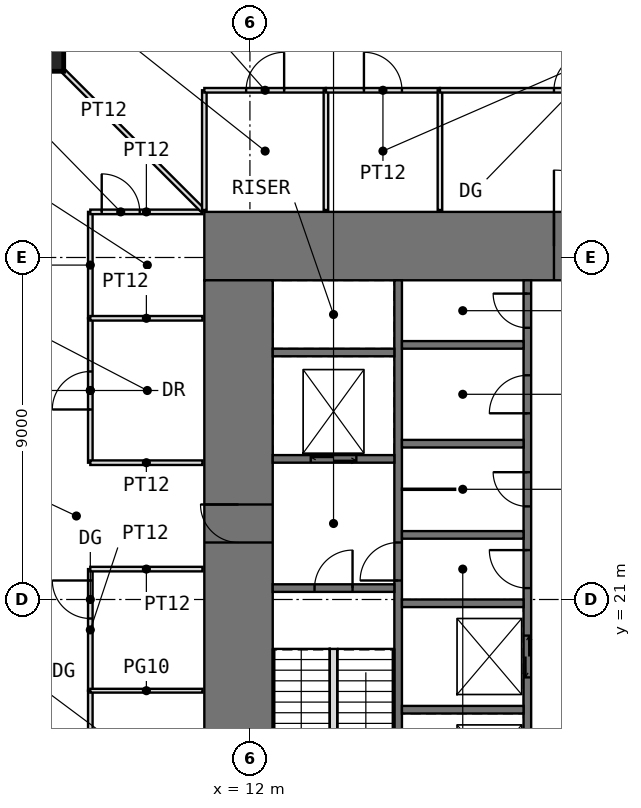
"""IFC4 building model, lengths in metres.
Left out: names, types, materials, properties, quantities, classifications, styles, units other than length and angle.
Written with IfcOpenShell. Run it as: python <this file> out.ifc"""

import sys

from ifc_helpers import new_model, si_unit, direction, frame, frame_2d, origin, origin_2d, place, context, subcontext, project, spatial, rectangle, extrude, element, fill, save


model = new_model("IFC4")
c1 = context("Model", 3, precision=1e-05, world=origin(), true_north=direction((0.0, 1.0)))
c2 = subcontext(c1, "Body", "Model", "MODEL_VIEW")
j1 = project(units=[si_unit("LENGTHUNIT", "METRE"), si_unit("PLANEANGLEUNIT", "RADIAN")], contexts=[c1])
p1 = place(None, origin())
s1 = spatial("IfcSite", under=j1, at=p1, CompositionType="ELEMENT")
p2 = place(p1, origin())
s2 = spatial("IfcBuilding", under=s1, at=p2, CompositionType="ELEMENT")
p3 = place(p2, frame((0.0, 0.0, 62.5)))
s3 = spatial("IfcBuildingStorey", under=s2, at=p3, CompositionType="ELEMENT", Elevation=62.5)
p4 = place(p3, frame((6.55, 35.45, 0.0), z_axis=(0.0, 0.0, 1.0), x_axis=(1.0, 0.0, 0.0)))
e1 = element("IfcColumn", 1, at=p4, inside=s3, PredefinedType="COLUMN", context=c2, shape_type="SweptSolid", body=[
    extrude(rectangle(XDim=1.1, YDim=1.1, at=origin_2d()), origin(), (0.0, 0.0, 1.0), 4.0),
])
p5 = place(p3, frame((10.8, 30.3, -0.05), z_axis=(0.0, 0.0, 1.0), x_axis=(1.0, 0.0, 0.0)))
e2 = element("IfcWall", 2, at=p5, inside=s3, PredefinedType="SHEAR", context=c2, shape_type="SweptSolid", body=[
    extrude(rectangle(XDim=20.4, YDim=1.8, at=frame_2d((10.2, 0.0))), origin(), (0.0, 0.0, 1.0), 4.0),
])
p6 = place(p5, frame((9.2, 0.0, 0.05)))
e3 = element("IfcOpeningElement", 3, at=p6, cuts=e2, PredefinedType="OPENING", context=c2, shape_type="SweptSolid", body=[
    extrude(rectangle(XDim=2.0, YDim=2.2, at=frame_2d((1.0, 1.1))), frame((0.0, 0.91, 0.0), z_axis=(0.0, -1.0, 0.0), x_axis=(1.0, 0.0, 0.0)), (0.0, 0.0, 1.0), 1.82),
])
p7 = place(p3, frame((11.7, 12.6, -0.05), z_axis=(0.0, 0.0, 1.0), x_axis=(0.0, 1.0, 0.0)))
e4 = element("IfcWall", 4, at=p7, inside=s3, PredefinedType="SHEAR", context=c2, shape_type="SweptSolid", body=[
    extrude(rectangle(XDim=16.8, YDim=1.8, at=frame_2d((8.4, 0.0))), origin(), (0.0, 0.0, 1.0), 4.0),
])
p8 = place(p7, frame((9.9, 0.0, 0.05)))
e5 = element("IfcOpeningElement", 5, at=p8, cuts=e4, PredefinedType="OPENING", context=c2, shape_type="SweptSolid", body=[
    extrude(rectangle(XDim=1.0, YDim=2.2, at=frame_2d((0.5, 1.1))), frame((0.0, 0.91, 0.0), z_axis=(0.0, -1.0, 0.0), x_axis=(1.0, 0.0, 0.0)), (0.0, 0.0, 1.0), 1.82),
])
p9 = place(p3, frame((15.9, 12.6, -0.05), z_axis=(0.0, 0.0, 1.0), x_axis=(0.0, 1.0, 0.0)))
e6 = element("IfcWall", 6, at=p9, inside=s3, PredefinedType="SHEAR", context=c2, shape_type="SweptSolid", body=[
    extrude(rectangle(XDim=16.8, YDim=0.2, at=frame_2d((8.4, 0.0))), origin(), (0.0, 0.0, 1.0), 4.0),
])
p10 = place(p9, frame((8.9, 0.0, 0.05)))
e7 = element("IfcOpeningElement", 7, at=p10, cuts=e6, PredefinedType="OPENING", context=c2, shape_type="SweptSolid", body=[
    extrude(rectangle(XDim=1.0, YDim=2.2, at=frame_2d((0.5, 1.1))), frame((0.0, 0.11, 0.0), z_axis=(0.0, -1.0, 0.0), x_axis=(1.0, 0.0, 0.0)), (0.0, 0.0, 1.0), 0.22),
])
p11 = place(p3, frame((19.3, 12.6, -0.05), z_axis=(0.0, 0.0, 1.0), x_axis=(0.0, 1.0, 0.0)))
e8 = element("IfcWall", 8, at=p11, inside=s3, PredefinedType="SHEAR", context=c2, shape_type="SweptSolid", body=[
    extrude(rectangle(XDim=16.8, YDim=0.2, at=frame_2d((8.4, 0.0))), origin(), (0.0, 0.0, 1.0), 4.0),
])
p12 = place(p11, frame((8.7, 0.0, 0.05)))
e9 = element("IfcOpeningElement", 9, at=p12, cuts=e8, PredefinedType="OPENING", context=c2, shape_type="SweptSolid", body=[
    extrude(rectangle(XDim=1.0, YDim=2.2, at=frame_2d((0.5, 1.1))), frame((0.0, 0.11, 0.0), z_axis=(0.0, -1.0, 0.0), x_axis=(1.0, 0.0, 0.0)), (0.0, 0.0, 1.0), 0.22),
])
p13 = place(p11, frame((10.85, 0.0, 0.05)))
e10 = element("IfcOpeningElement", 10, at=p13, cuts=e8, PredefinedType="OPENING", context=c2, shape_type="SweptSolid", body=[
    extrude(rectangle(XDim=0.9, YDim=2.2, at=frame_2d((0.45, 1.1))), frame((0.0, 0.11, 0.0), z_axis=(0.0, -1.0, 0.0), x_axis=(1.0, 0.0, 0.0)), (0.0, 0.0, 1.0), 0.22),
])
p14 = place(p11, frame((13.3, 0.0, 0.05)))
e11 = element("IfcOpeningElement", 11, at=p14, cuts=e8, PredefinedType="OPENING", context=c2, shape_type="SweptSolid", body=[
    extrude(rectangle(XDim=1.0, YDim=2.2, at=frame_2d((0.5, 1.1))), frame((0.0, 0.11, 0.0), z_axis=(0.0, -1.0, 0.0), x_axis=(1.0, 0.0, 0.0)), (0.0, 0.0, 1.0), 0.22),
])
p15 = place(p11, frame((15.55, 0.0, 0.05)))
e12 = element("IfcOpeningElement", 12, at=p15, cuts=e8, PredefinedType="OPENING", context=c2, shape_type="SweptSolid", body=[
    extrude(rectangle(XDim=0.9, YDim=2.2, at=frame_2d((0.45, 1.1))), frame((0.0, 0.11, 0.0), z_axis=(0.0, -1.0, 0.0), x_axis=(1.0, 0.0, 0.0)), (0.0, 0.0, 1.0), 0.22),
])
p16 = place(p11, frame((0.75, 0.0, 0.05)))
e13 = element("IfcOpeningElement", 13, at=p16, cuts=e8, PredefinedType="OPENING", context=c2, shape_type="SweptSolid", body=[
    extrude(rectangle(XDim=1.1, YDim=2.2, at=frame_2d((0.55, 1.1))), frame((0.0, 0.11, 0.0), z_axis=(0.0, -1.0, 0.0), x_axis=(1.0, 0.0, 0.0)), (0.0, 0.0, 1.0), 0.22),
])
p17 = place(p11, frame((3.55, 0.0, 0.05)))
e14 = element("IfcOpeningElement", 14, at=p17, cuts=e8, PredefinedType="OPENING", context=c2, shape_type="SweptSolid", body=[
    extrude(rectangle(XDim=1.1, YDim=2.2, at=frame_2d((0.55, 1.1))), frame((0.0, 0.11, 0.0), z_axis=(0.0, -1.0, 0.0), x_axis=(1.0, 0.0, 0.0)), (0.0, 0.0, 1.0), 0.22),
])
p18 = place(p11, frame((6.35, 0.0, 0.05)))
e15 = element("IfcOpeningElement", 15, at=p18, cuts=e8, PredefinedType="OPENING", context=c2, shape_type="SweptSolid", body=[
    extrude(rectangle(XDim=1.1, YDim=2.2, at=frame_2d((0.55, 1.1))), frame((0.0, 0.11, 0.0), z_axis=(0.0, -1.0, 0.0), x_axis=(1.0, 0.0, 0.0)), (0.0, 0.0, 1.0), 0.22),
])
p19 = place(p3, frame((12.6, 21.3, -0.05), z_axis=(0.0, 0.0, 1.0), x_axis=(1.0, 0.0, 0.0)))
e16 = element("IfcWall", 16, at=p19, inside=s3, PredefinedType="SHEAR", context=c2, shape_type="SweptSolid", body=[
    extrude(rectangle(XDim=3.2, YDim=0.2, at=frame_2d((1.6, 0.0))), origin(), (0.0, 0.0, 1.0), 4.0),
])
p20 = place(p19, frame((1.1, 0.0, 0.05)))
e17 = element("IfcOpeningElement", 17, at=p20, cuts=e16, PredefinedType="OPENING", context=c2, shape_type="SweptSolid", body=[
    extrude(rectangle(XDim=1.0, YDim=2.2, at=frame_2d((0.5, 1.1))), frame((0.0, 0.11, 0.0), z_axis=(0.0, -1.0, 0.0), x_axis=(1.0, 0.0, 0.0)), (0.0, 0.0, 1.0), 0.22),
])
p21 = place(p3, frame((12.6, 24.7, -0.05), z_axis=(0.0, 0.0, 1.0), x_axis=(1.0, 0.0, 0.0)))
e18 = element("IfcWall", 18, at=p21, inside=s3, PredefinedType="SHEAR", context=c2, shape_type="SweptSolid", body=[
    extrude(rectangle(XDim=3.2, YDim=0.2, at=frame_2d((1.6, 0.0))), origin(), (0.0, 0.0, 1.0), 4.0),
])
p22 = place(p21, frame((1.0, 0.0, 0.05)))
e19 = element("IfcOpeningElement", 19, at=p22, cuts=e18, PredefinedType="OPENING", context=c2, shape_type="SweptSolid", body=[
    extrude(rectangle(XDim=1.2, YDim=2.2, at=frame_2d((0.6, 1.1))), frame((0.0, 0.11, 0.0), z_axis=(0.0, -1.0, 0.0), x_axis=(1.0, 0.0, 0.0)), (0.0, 0.0, 1.0), 0.22),
])
for number, where, z_axis, x_axis in (
    (20, (12.6, 27.5, -0.05), (0.0, 0.0, 1.0), (1.0, 0.0, 0.0)),
    (21, (16.0, 18.1, -0.05), (0.0, 0.0, 1.0), (1.0, 0.0, 0.0)),
    (22, (16.0, 20.9, -0.05), (0.0, 0.0, 1.0), (1.0, 0.0, 0.0)),
    (23, (16.0, 22.7, -0.05), (0.0, 0.0, 1.0), (1.0, 0.0, 0.0)),
    (24, (16.0, 25.1, -0.05), (0.0, 0.0, 1.0), (1.0, 0.0, 0.0)),
    (25, (16.0, 27.7, -0.05), (0.0, 0.0, 1.0), (1.0, 0.0, 0.0)),
):
    element("IfcWall", number, at=place(p3, frame(where, z_axis=z_axis, x_axis=x_axis)), inside=s3, PredefinedType="SHEAR", context=c2, shape_type="SweptSolid", body=[
        extrude(rectangle(XDim=3.2, YDim=0.2, at=frame_2d((1.6, 0.0))), origin(), (0.0, 0.0, 1.0), 4.0),
    ])
p23 = place(p3, frame((16.0, 23.9, 0.0), z_axis=(0.0, 0.0, 1.0), x_axis=(1.0, 0.0, 0.0)))
e26 = element("IfcWall", 26, at=p23, inside=s3, PredefinedType="PARTITIONING", context=c2, shape_type="SweptSolid", body=[
    extrude(rectangle(XDim=1.4, YDim=0.03, at=frame_2d((0.7, 0.0))), origin(), (0.0, 0.0, 1.0), 3.75),
])
p24 = place(p3, frame((7.11, 34.89, 0.0), z_axis=(0.0, 0.0, 1.0), x_axis=(0.707106781187, -0.707106781187, 0.0)))
e27 = element("IfcWall", 27, at=p24, inside=s3, PredefinedType="PARTITIONING", context=c2, shape_type="SweptSolid", body=[
    extrude(rectangle(XDim=2.95, YDim=0.12, at=frame_2d((1.475, 0.0))), origin(), (0.0, 0.0, 1.0), 3.75),
])
p25 = place(p3, frame((7.8, 14.6, 0.0), z_axis=(0.0, 0.0, 1.0), x_axis=(0.0, 1.0, 0.0)))
e28 = element("IfcWall", 28, at=p25, inside=s3, PredefinedType="PARTITIONING", context=c2, shape_type="SweptSolid", body=[
    extrude(rectangle(XDim=4.0, YDim=0.12, at=frame_2d((2.0, 0.0))), origin(), (0.0, 0.0, 1.0), 3.75),
])
p26 = place(p25, frame((1.5, 0.0, 0.0)))
e29 = element("IfcOpeningElement", 29, at=p26, cuts=e28, PredefinedType="OPENING", context=c2, shape_type="SweptSolid", body=[
    extrude(rectangle(XDim=1.0, YDim=2.4, at=frame_2d((0.5, 1.2))), frame((0.0, 0.07, 0.0), z_axis=(0.0, -1.0, 0.0), x_axis=(1.0, 0.0, 0.0)), (0.0, 0.0, 1.0), 0.14),
])
p27 = place(p3, frame((7.8, 18.6, 0.0), z_axis=(0.0, 0.0, 1.0), x_axis=(0.0, 1.0, 0.0)))
e30 = element("IfcWall", 30, at=p27, inside=s3, PredefinedType="PARTITIONING", context=c2, shape_type="SweptSolid", body=[
    extrude(rectangle(XDim=3.2, YDim=0.12, at=frame_2d((1.6, 0.0))), origin(), (0.0, 0.0, 1.0), 3.75),
])
p28 = place(p27, frame((1.9, 0.0, 0.0)))
e31 = element("IfcOpeningElement", 31, at=p28, cuts=e30, PredefinedType="OPENING", context=c2, shape_type="SweptSolid", body=[
    extrude(rectangle(XDim=1.0, YDim=2.4, at=frame_2d((0.5, 1.2))), frame((0.0, 0.07, 0.0), z_axis=(0.0, -1.0, 0.0), x_axis=(1.0, 0.0, 0.0)), (0.0, 0.0, 1.0), 0.14),
])
p29 = place(p3, frame((7.8, 18.6, 0.0), z_axis=(0.0, 0.0, 1.0), x_axis=(1.0, 0.0, 0.0)))
e32 = element("IfcWall", 32, at=p29, inside=s3, PredefinedType="PARTITIONING", context=c2, shape_type="SweptSolid", body=[
    extrude(rectangle(XDim=2.95, YDim=0.1, at=frame_2d((1.475, 0.0))), origin(), (0.0, 0.0, 1.0), 3.75),
])
p30 = place(p3, frame((7.8, 21.8, 0.0), z_axis=(0.0, 0.0, 1.0), x_axis=(1.0, 0.0, 0.0)))
e33 = element("IfcWall", 33, at=p30, inside=s3, PredefinedType="PARTITIONING", context=c2, shape_type="SweptSolid", body=[
    extrude(rectangle(XDim=2.95, YDim=0.12, at=frame_2d((1.475, 0.0))), origin(), (0.0, 0.0, 1.0), 3.75),
])
p31 = place(p3, frame((7.8, 24.6, 0.0), z_axis=(0.0, 0.0, 1.0), x_axis=(0.0, 1.0, 0.0)))
e34 = element("IfcWall", 34, at=p31, inside=s3, PredefinedType="PARTITIONING", context=c2, shape_type="SweptSolid", body=[
    extrude(rectangle(XDim=3.8, YDim=0.12, at=frame_2d((1.9, 0.0))), origin(), (0.0, 0.0, 1.0), 3.75),
])
p32 = place(p31, frame((1.4, 0.0, 0.0)))
e35 = element("IfcOpeningElement", 35, at=p32, cuts=e34, PredefinedType="OPENING", context=c2, shape_type="SweptSolid", body=[
    extrude(rectangle(XDim=1.0, YDim=2.2, at=frame_2d((0.5, 1.1))), frame((0.0, 0.07, 0.0), z_axis=(0.0, -1.0, 0.0), x_axis=(1.0, 0.0, 0.0)), (0.0, 0.0, 1.0), 0.14),
])
p33 = place(p3, frame((7.8, 24.6, 0.0), z_axis=(0.0, 0.0, 1.0), x_axis=(1.0, 0.0, 0.0)))
e36 = element("IfcWall", 36, at=p33, inside=s3, PredefinedType="PARTITIONING", context=c2, shape_type="SweptSolid", body=[
    extrude(rectangle(XDim=2.95, YDim=0.12, at=frame_2d((1.475, 0.0))), origin(), (0.0, 0.0, 1.0), 3.75),
])
p34 = place(p3, frame((7.8, 28.4, 0.0), z_axis=(0.0, 0.0, 1.0), x_axis=(0.0, 1.0, 0.0)))
e37 = element("IfcWall", 37, at=p34, inside=s3, PredefinedType="PARTITIONING", context=c2, shape_type="SweptSolid", body=[
    extrude(rectangle(XDim=2.8, YDim=0.12, at=frame_2d((1.4, 0.0))), origin(), (0.0, 0.0, 1.0), 3.75),
])
p35 = place(p3, frame((7.8, 28.4, 0.0), z_axis=(0.0, 0.0, 1.0), x_axis=(1.0, 0.0, 0.0)))
e38 = element("IfcWall", 38, at=p35, inside=s3, PredefinedType="PARTITIONING", context=c2, shape_type="SweptSolid", body=[
    extrude(rectangle(XDim=2.95, YDim=0.12, at=frame_2d((1.475, 0.0))), origin(), (0.0, 0.0, 1.0), 3.75),
])
p36 = place(p3, frame((7.8, 31.2, 0.0), z_axis=(0.0, 0.0, 1.0), x_axis=(1.0, 0.0, 0.0)))
e39 = element("IfcWall", 39, at=p36, inside=s3, PredefinedType="PARTITIONING", context=c2, shape_type="SweptSolid", body=[
    extrude(rectangle(XDim=2.95, YDim=0.12, at=frame_2d((1.475, 0.0))), origin(), (0.0, 0.0, 1.0), 3.75),
])
p37 = place(p36, frame((0.3, 0.0, 0.0)))
e40 = element("IfcOpeningElement", 40, at=p37, cuts=e39, PredefinedType="OPENING", context=c2, shape_type="SweptSolid", body=[
    extrude(rectangle(XDim=1.0, YDim=2.4, at=frame_2d((0.5, 1.2))), frame((0.0, 0.07, 0.0), z_axis=(0.0, -1.0, 0.0), x_axis=(1.0, 0.0, 0.0)), (0.0, 0.0, 1.0), 0.14),
])
p38 = place(p3, frame((9.196, 32.804, 0.0), z_axis=(0.0, 0.0, 1.0), x_axis=(0.707106781187, -0.707106781187, 0.0)))
e41 = element("IfcWall", 41, at=p38, inside=s3, PredefinedType="PARTITIONING", context=c2, shape_type="SweptSolid", body=[
    extrude(rectangle(XDim=2.218, YDim=0.12, at=frame_2d((1.109, 0.0))), origin(), (0.0, 0.0, 1.0), 3.75),
])
p39 = place(p3, frame((10.8, 31.25, 0.0), z_axis=(0.0, 0.0, 1.0), x_axis=(0.0, 1.0, 0.0)))
e42 = element("IfcWall", 42, at=p39, inside=s3, PredefinedType="PARTITIONING", context=c2, shape_type="SweptSolid", body=[
    extrude(rectangle(XDim=3.15, YDim=0.12, at=frame_2d((1.575, 0.0))), origin(), (0.0, 0.0, 1.0), 3.75),
])
p40 = place(p3, frame((10.8, 34.4, 0.0), z_axis=(0.0, 0.0, 1.0), x_axis=(1.0, 0.0, 0.0)))
e43 = element("IfcWall", 43, at=p40, inside=s3, PredefinedType="PARTITIONING", context=c2, shape_type="SweptSolid", body=[
    extrude(rectangle(XDim=3.2, YDim=0.12, at=frame_2d((1.6, 0.0))), origin(), (0.0, 0.0, 1.0), 3.75),
])
p41 = place(p40, frame((1.1, 0.0, 0.0)))
e44 = element("IfcOpeningElement", 44, at=p41, cuts=e43, PredefinedType="OPENING", context=c2, shape_type="SweptSolid", body=[
    extrude(rectangle(XDim=1.0, YDim=2.2, at=frame_2d((0.5, 1.1))), frame((0.0, 0.07, 0.0), z_axis=(0.0, -1.0, 0.0), x_axis=(1.0, 0.0, 0.0)), (0.0, 0.0, 1.0), 0.14),
])
p42 = place(p3, frame((14.0, 31.25, 0.0), z_axis=(0.0, 0.0, 1.0), x_axis=(0.0, 1.0, 0.0)))
e45 = element("IfcWall", 45, at=p42, inside=s3, PredefinedType="PARTITIONING", context=c2, shape_type="SweptSolid", body=[
    extrude(rectangle(XDim=3.15, YDim=0.12, at=frame_2d((1.575, 0.0))), origin(), (0.0, 0.0, 1.0), 3.75),
])
p43 = place(p3, frame((14.0, 34.4, 0.0), z_axis=(0.0, 0.0, 1.0), x_axis=(1.0, 0.0, 0.0)))
e46 = element("IfcWall", 46, at=p43, inside=s3, PredefinedType="PARTITIONING", context=c2, shape_type="SweptSolid", body=[
    extrude(rectangle(XDim=3.0, YDim=0.12, at=frame_2d((1.5, 0.0))), origin(), (0.0, 0.0, 1.0), 3.75),
])
p44 = place(p43, frame((1.0, 0.0, 0.0)))
e47 = element("IfcOpeningElement", 47, at=p44, cuts=e46, PredefinedType="OPENING", context=c2, shape_type="SweptSolid", body=[
    extrude(rectangle(XDim=1.0, YDim=2.2, at=frame_2d((0.5, 1.1))), frame((0.0, 0.07, 0.0), z_axis=(0.0, -1.0, 0.0), x_axis=(1.0, 0.0, 0.0)), (0.0, 0.0, 1.0), 0.14),
])
p45 = place(p3, frame((17.0, 31.25, 0.0), z_axis=(0.0, 0.0, 1.0), x_axis=(0.0, 1.0, 0.0)))
e48 = element("IfcWall", 48, at=p45, inside=s3, PredefinedType="PARTITIONING", context=c2, shape_type="SweptSolid", body=[
    extrude(rectangle(XDim=3.15, YDim=0.12, at=frame_2d((1.575, 0.0))), origin(), (0.0, 0.0, 1.0), 3.75),
])
p46 = place(p3, frame((17.0, 34.4, 0.0), z_axis=(0.0, 0.0, 1.0), x_axis=(1.0, 0.0, 0.0)))
e49 = element("IfcWall", 49, at=p46, inside=s3, PredefinedType="PARTITIONING", context=c2, shape_type="SweptSolid", body=[
    extrude(rectangle(XDim=7.0, YDim=0.12, at=frame_2d((3.5, 0.0))), origin(), (0.0, 0.0, 1.0), 3.75),
])
p47 = place(p46, frame((3.0, 0.0, 0.0)))
e50 = element("IfcOpeningElement", 50, at=p47, cuts=e49, PredefinedType="OPENING", context=c2, shape_type="SweptSolid", body=[
    extrude(rectangle(XDim=1.0, YDim=2.4, at=frame_2d((0.5, 1.2))), frame((0.0, 0.07, 0.0), z_axis=(0.0, -1.0, 0.0), x_axis=(1.0, 0.0, 0.0)), (0.0, 0.0, 1.0), 0.14),
])
p48 = place(p3, frame((14.2, 16.62, 0.0), z_axis=(0.0, 0.0, 1.0), x_axis=(0.0, 1.0, 0.0)))
e51 = element("IfcWall", 51, at=p48, inside=s3, PredefinedType="PARTITIONING", context=c2, shape_type="SweptSolid", body=[
    extrude(rectangle(XDim=3.08, YDim=0.2, at=frame_2d((1.54, 0.0))), origin(), (0.0, 0.0, 1.0), 4.0),
])
p49 = place(p6, origin())
e52 = element("IfcDoor", 52, at=p49, inside=s3, OperationType="DOUBLE_DOOR_SINGLE_SWING", PredefinedType="DOOR", context=c2, shape_type="SweptSolid", body=[
    extrude(rectangle(XDim=2.0, YDim=2.2, at=frame_2d((1.0, 1.1))), frame((0.0, 0.025, 0.0), z_axis=(0.0, -1.0, 0.0), x_axis=(1.0, 0.0, 0.0)), (0.0, 0.0, 1.0), 0.05),
])
fill(e3, e52)
p50 = place(p8, origin())
e53 = element("IfcDoor", 53, at=p50, inside=s3, OperationType="SINGLE_SWING_RIGHT", PredefinedType="DOOR", context=c2, shape_type="SweptSolid", body=[
    extrude(rectangle(XDim=1.0, YDim=2.2, at=frame_2d((0.5, 1.1))), frame((0.0, 0.025, 0.0), z_axis=(0.0, -1.0, 0.0), x_axis=(1.0, 0.0, 0.0)), (0.0, 0.0, 1.0), 0.05),
])
fill(e5, e53)
p51 = place(p20, origin())
e54 = element("IfcDoor", 54, at=p51, inside=s3, OperationType="SINGLE_SWING_RIGHT", PredefinedType="DOOR", context=c2, shape_type="SweptSolid", body=[
    extrude(rectangle(XDim=1.0, YDim=2.2, at=frame_2d((0.5, 1.1))), frame((0.0, 0.025, 0.0), z_axis=(0.0, -1.0, 0.0), x_axis=(1.0, 0.0, 0.0)), (0.0, 0.0, 1.0), 0.05),
])
fill(e17, e54)
p52 = place(p10, origin())
e55 = element("IfcDoor", 55, at=p52, inside=s3, OperationType="SINGLE_SWING_LEFT", PredefinedType="DOOR", context=c2, shape_type="SweptSolid", body=[
    extrude(rectangle(XDim=1.0, YDim=2.2, at=frame_2d((0.5, 1.1))), frame((0.0, 0.025, 0.0), z_axis=(0.0, -1.0, 0.0), x_axis=(1.0, 0.0, 0.0)), (0.0, 0.0, 1.0), 0.05),
])
fill(e7, e55)
p53 = place(p12, origin())
e56 = element("IfcDoor", 56, at=p53, inside=s3, OperationType="SINGLE_SWING_RIGHT", PredefinedType="DOOR", context=c2, shape_type="SweptSolid", body=[
    extrude(rectangle(XDim=1.0, YDim=2.2, at=frame_2d((0.5, 1.1))), frame((0.0, 0.025, 0.0), z_axis=(0.0, -1.0, 0.0), x_axis=(1.0, 0.0, 0.0)), (0.0, 0.0, 1.0), 0.05),
])
fill(e9, e56)
p54 = place(p13, origin())
e57 = element("IfcDoor", 57, at=p54, inside=s3, OperationType="SINGLE_SWING_RIGHT", PredefinedType="DOOR", context=c2, shape_type="SweptSolid", body=[
    extrude(rectangle(XDim=0.9, YDim=2.2, at=frame_2d((0.45, 1.1))), frame((0.0, 0.025, 0.0), z_axis=(0.0, -1.0, 0.0), x_axis=(1.0, 0.0, 0.0)), (0.0, 0.0, 1.0), 0.05),
])
fill(e10, e57)
p55 = place(p14, origin())
e58 = element("IfcDoor", 58, at=p55, inside=s3, OperationType="SINGLE_SWING_LEFT", PredefinedType="DOOR", context=c2, shape_type="SweptSolid", body=[
    extrude(rectangle(XDim=1.0, YDim=2.2, at=frame_2d((0.5, 1.1))), frame((0.0, 0.025, 0.0), z_axis=(0.0, -1.0, 0.0), x_axis=(1.0, 0.0, 0.0)), (0.0, 0.0, 1.0), 0.05),
])
fill(e11, e58)
p56 = place(p15, origin())
e59 = element("IfcDoor", 59, at=p56, inside=s3, OperationType="SINGLE_SWING_RIGHT", PredefinedType="DOOR", context=c2, shape_type="SweptSolid", body=[
    extrude(rectangle(XDim=0.9, YDim=2.2, at=frame_2d((0.45, 1.1))), frame((0.0, 0.025, 0.0), z_axis=(0.0, -1.0, 0.0), x_axis=(1.0, 0.0, 0.0)), (0.0, 0.0, 1.0), 0.05),
])
fill(e12, e59)
p57 = place(p41, origin())
e60 = element("IfcDoor", 60, at=p57, inside=s3, OperationType="SINGLE_SWING_RIGHT", PredefinedType="DOOR", context=c2, shape_type="SweptSolid", body=[
    extrude(rectangle(XDim=1.0, YDim=2.2, at=frame_2d((0.5, 1.1))), frame((0.0, 0.025, 0.0), z_axis=(0.0, -1.0, 0.0), x_axis=(1.0, 0.0, 0.0)), (0.0, 0.0, 1.0), 0.05),
])
fill(e44, e60)
p58 = place(p44, origin())
e61 = element("IfcDoor", 61, at=p58, inside=s3, OperationType="SINGLE_SWING_LEFT", PredefinedType="DOOR", context=c2, shape_type="SweptSolid", body=[
    extrude(rectangle(XDim=1.0, YDim=2.2, at=frame_2d((0.5, 1.1))), frame((0.0, 0.025, 0.0), z_axis=(0.0, -1.0, 0.0), x_axis=(1.0, 0.0, 0.0)), (0.0, 0.0, 1.0), 0.05),
])
fill(e47, e61)
p59 = place(p32, origin())
e62 = element("IfcDoor", 62, at=p59, inside=s3, OperationType="SINGLE_SWING_LEFT", PredefinedType="DOOR", context=c2, shape_type="SweptSolid", body=[
    extrude(rectangle(XDim=1.0, YDim=2.2, at=frame_2d((0.5, 1.1))), frame((0.0, 0.025, 0.0), z_axis=(0.0, -1.0, 0.0), x_axis=(1.0, 0.0, 0.0)), (0.0, 0.0, 1.0), 0.05),
])
fill(e35, e62)
p60 = place(p47, origin())
e63 = element("IfcDoor", 63, at=p60, inside=s3, OperationType="SINGLE_SWING_RIGHT", PredefinedType="DOOR", context=c2, shape_type="SweptSolid", body=[
    extrude(rectangle(XDim=1.0, YDim=2.4, at=frame_2d((0.5, 1.2))), frame((0.0, 0.025, 0.0), z_axis=(0.0, -1.0, 0.0), x_axis=(1.0, 0.0, 0.0)), (0.0, 0.0, 1.0), 0.05),
])
fill(e50, e63)
p61 = place(p37, origin())
e64 = element("IfcDoor", 64, at=p61, inside=s3, OperationType="SINGLE_SWING_LEFT", PredefinedType="DOOR", context=c2, shape_type="SweptSolid", body=[
    extrude(rectangle(XDim=1.0, YDim=2.4, at=frame_2d((0.5, 1.2))), frame((0.0, 0.025, 0.0), z_axis=(0.0, -1.0, 0.0), x_axis=(1.0, 0.0, 0.0)), (0.0, 0.0, 1.0), 0.05),
])
fill(e40, e64)
p62 = place(p28, origin())
e65 = element("IfcDoor", 65, at=p62, inside=s3, OperationType="SINGLE_SWING_RIGHT", PredefinedType="DOOR", context=c2, shape_type="SweptSolid", body=[
    extrude(rectangle(XDim=1.0, YDim=2.4, at=frame_2d((0.5, 1.2))), frame((0.0, 0.025, 0.0), z_axis=(0.0, -1.0, 0.0), x_axis=(1.0, 0.0, 0.0)), (0.0, 0.0, 1.0), 0.05),
])
fill(e31, e65)
p63 = place(p18, origin())
e66 = element("IfcDoor", 66, at=p63, inside=s3, OperationType="DOUBLE_DOOR_SLIDING", PredefinedType="DOOR", context=c2, shape_type="SweptSolid", body=[
    extrude(rectangle(XDim=1.1, YDim=2.2, at=frame_2d((0.55, 1.1))), frame((0.0, 0.025, 0.0), z_axis=(0.0, -1.0, 0.0), x_axis=(1.0, 0.0, 0.0)), (0.0, 0.0, 1.0), 0.05),
])
fill(e15, e66)
p64 = place(p22, origin())
e67 = element("IfcDoor", 67, at=p64, inside=s3, OperationType="DOUBLE_DOOR_SLIDING", PredefinedType="DOOR", context=c2, shape_type="SweptSolid", body=[
    extrude(rectangle(XDim=1.2, YDim=2.2, at=frame_2d((0.6, 1.1))), frame((0.0, 0.025, 0.0), z_axis=(0.0, -1.0, 0.0), x_axis=(1.0, 0.0, 0.0)), (0.0, 0.0, 1.0), 0.05),
])
fill(e19, e67)
save(model, sys.argv[1])
